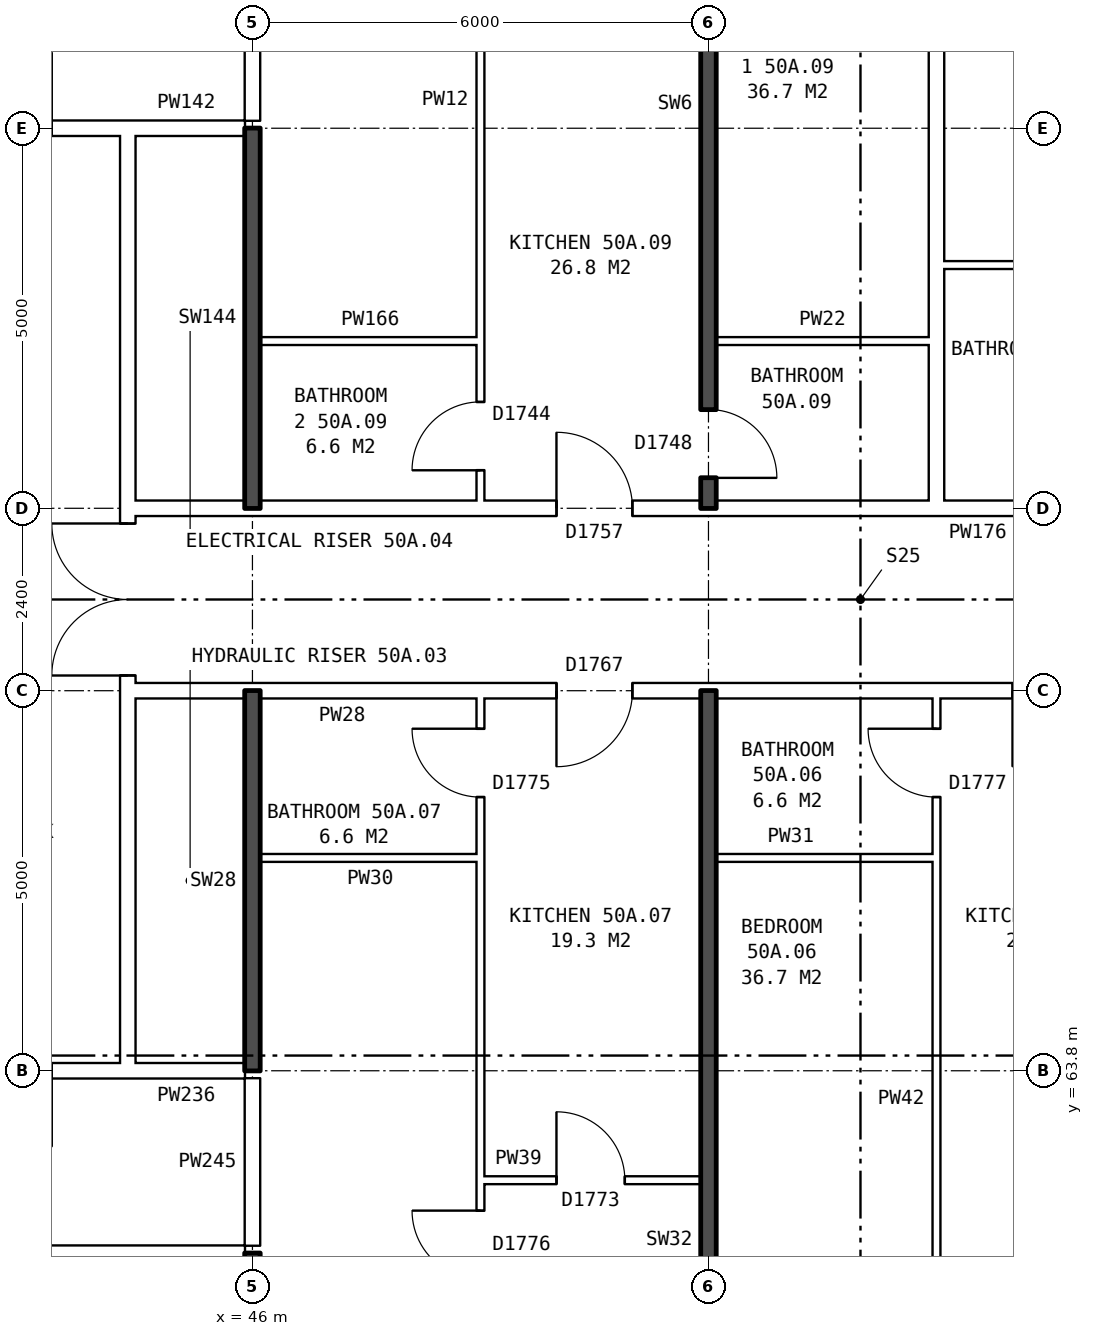
"""IFC4 building model, lengths in metres.
Left out: names, types, materials, properties, quantities, classifications, styles, units other than length and angle.
Written with IfcOpenShell. Run it as: python <this file> out.ifc"""

import sys

from ifc_helpers import new_model, si_unit, direction, frame, frame_2d, origin, place, context, subcontext, project, spatial, rectangle, extrude, element, fill, save


model = new_model("IFC4")
c1 = context("Model", 3, precision=1e-05, world=origin(), true_north=direction((0.0, 1.0)))
c2 = subcontext(c1, "Body", "Model", "MODEL_VIEW")
j1 = project(units=[si_unit("LENGTHUNIT", "METRE"), si_unit("PLANEANGLEUNIT", "RADIAN")], contexts=[c1])
p1 = place(None, origin())
s1 = spatial("IfcSite", under=j1, at=p1, CompositionType="ELEMENT")
p2 = place(p1, origin())
s2 = spatial("IfcBuilding", under=s1, at=p2, CompositionType="ELEMENT")
p3 = place(p2, frame((0.0, 0.0, 178.9)))
s3 = spatial("IfcBuildingStorey", under=s2, at=p3, CompositionType="ELEMENT", Elevation=178.9)
p4 = place(p3, frame((44.36, 63.9, 0.0), z_axis=(0.0, 0.0, 1.0), x_axis=(0.0, 1.0, 0.0)))
e1 = element("IfcWall", 1, at=p4, inside=s3, PredefinedType="PARTITIONING", context=c2, shape_type="SweptSolid", body=[
    extrude(rectangle(XDim=12.2, YDim=0.2, at=frame_2d((6.1, 0.0))), origin(), (0.0, 0.0, 1.0), 2.85),
])
p5 = place(p4, frame((5.1, 0.0, 0.0)))
e2 = element("IfcOpeningElement", 2, at=p5, cuts=e1, PredefinedType="OPENING", context=c2, shape_type="SweptSolid", body=[
    extrude(rectangle(XDim=2.0, YDim=2.1, at=frame_2d((1.0, 1.05))), frame((0.0, 0.11, 0.0), z_axis=(0.0, -1.0, 0.0), x_axis=(1.0, 0.0, 0.0)), (0.0, 0.0, 1.0), 0.22),
])
p6 = place(p3, frame((30.61, 61.4, 0.0), z_axis=(0.0, 0.0, 1.0), x_axis=(1.0, 0.0, 0.0)))
e3 = element("IfcWall", 3, at=p6, inside=s3, PredefinedType="PARTITIONING", context=c2, shape_type="SweptSolid", body=[
    extrude(rectangle(XDim=15.29, YDim=0.2, at=frame_2d((7.645, 0.0))), origin(), (0.0, 0.0, 1.0), 2.85),
])
p7 = place(p6, frame((10.69, 0.0, 0.0)))
e4 = element("IfcOpeningElement", 4, at=p7, cuts=e3, PredefinedType="OPENING", context=c2, shape_type="SweptSolid", body=[
    extrude(rectangle(XDim=1.0, YDim=2.1, at=frame_2d((0.5, 1.05))), frame((0.0, 0.11, 0.0), z_axis=(0.0, -1.0, 0.0), x_axis=(1.0, 0.0, 0.0)), (0.0, 0.0, 1.0), 0.22),
])
p8 = place(p6, frame((5.89, 0.0, 0.0)))
e5 = element("IfcOpeningElement", 5, at=p8, cuts=e3, PredefinedType="OPENING", context=c2, shape_type="SweptSolid", body=[
    extrude(rectangle(XDim=1.0, YDim=2.1, at=frame_2d((0.5, 1.05))), frame((0.0, 0.11, 0.0), z_axis=(0.0, -1.0, 0.0), x_axis=(1.0, 0.0, 0.0)), (0.0, 0.0, 1.0), 0.22),
])
p9 = place(p3, frame((49.0, 62.36, 0.0), z_axis=(0.0, 0.0, 1.0), x_axis=(1.0, 0.0, 0.0)))
e6 = element("IfcWall", 6, at=p9, inside=s3, PredefinedType="PARTITIONING", context=c2, shape_type="SweptSolid", body=[
    extrude(rectangle(XDim=2.9, YDim=0.1, at=frame_2d((1.45, 0.0))), origin(), (0.0, 0.0, 1.0), 2.85),
])
p10 = place(p9, frame((1.0, 0.0, 0.0)))
e7 = element("IfcOpeningElement", 7, at=p10, cuts=e6, PredefinedType="OPENING", context=c2, shape_type="SweptSolid", body=[
    extrude(rectangle(XDim=0.9, YDim=2.1, at=frame_2d((0.45, 1.05))), frame((0.0, 0.06, 0.0), z_axis=(0.0, -1.0, 0.0), x_axis=(1.0, 0.0, 0.0)), (0.0, 0.0, 1.0), 0.12),
])
p11 = place(p3, frame((41.36, 63.8, 0.0), z_axis=(0.0, 0.0, 1.0), x_axis=(1.0, 0.0, 0.0)))
e8 = element("IfcWall", 8, at=p11, inside=s3, PredefinedType="PARTITIONING", context=c2, shape_type="SweptSolid", body=[
    extrude(rectangle(XDim=3.0, YDim=0.2, at=frame_2d((1.5, 0.0))), origin(), (0.0, 0.0, 1.0), 2.85),
])
p12 = place(p11, frame((1.0, 0.0, 0.0)))
e9 = element("IfcOpeningElement", 9, at=p12, cuts=e8, PredefinedType="OPENING", context=c2, shape_type="SweptSolid", body=[
    extrude(rectangle(XDim=1.0, YDim=2.1, at=frame_2d((0.5, 1.05))), frame((0.0, 0.11, 0.0), z_axis=(0.0, -1.0, 0.0), x_axis=(1.0, 0.0, 0.0)), (0.0, 0.0, 1.0), 0.22),
])
p13 = place(p3, frame((44.36, 63.8, 0.0), z_axis=(0.0, 0.0, 1.0), x_axis=(1.0, 0.0, 0.0)))
e10 = element("IfcWall", 10, at=p13, inside=s3, PredefinedType="PARTITIONING", context=c2, shape_type="SweptSolid", body=[
    extrude(rectangle(XDim=1.54, YDim=0.2, at=frame_2d((0.77, 0.0))), origin(), (0.0, 0.0, 1.0), 2.85),
])
for number, where, z_axis, x_axis in (
    (11, (46.1, 66.6, 0.0), (0.0, 0.0, 1.0), (1.0, 0.0, 0.0)),
    (12, (52.1, 66.6, 0.0), (0.0, 0.0, 1.0), (1.0, 0.0, 0.0)),
):
    element("IfcWall", number, at=place(p3, frame(where, z_axis=z_axis, x_axis=x_axis)), inside=s3, PredefinedType="PARTITIONING", context=c2, shape_type="SweptSolid", body=[
        extrude(rectangle(XDim=2.9, YDim=0.1, at=frame_2d((1.45, 0.0))), origin(), (0.0, 0.0, 1.0), 2.85),
    ])
p14 = place(p3, frame((44.36, 68.8, 0.0), z_axis=(0.0, 0.0, 1.0), x_axis=(1.0, 0.0, 0.0)))
e13 = element("IfcWall", 13, at=p14, inside=s3, PredefinedType="PARTITIONING", context=c2, shape_type="SweptSolid", body=[
    extrude(rectangle(XDim=19.28, YDim=0.2, at=frame_2d((9.64, 0.0))), origin(), (0.0, 0.0, 1.0), 2.85),
])
p15 = place(p14, frame((14.64, 0.0, 0.0)))
e14 = element("IfcOpeningElement", 14, at=p15, cuts=e13, PredefinedType="OPENING", context=c2, shape_type="SweptSolid", body=[
    extrude(rectangle(XDim=1.0, YDim=2.1, at=frame_2d((0.5, 1.05))), frame((0.0, 0.11, 0.0), z_axis=(0.0, -1.0, 0.0), x_axis=(1.0, 0.0, 0.0)), (0.0, 0.0, 1.0), 0.22),
])
p16 = place(p14, frame((11.64, 0.0, 0.0)))
e15 = element("IfcOpeningElement", 15, at=p16, cuts=e13, PredefinedType="OPENING", context=c2, shape_type="SweptSolid", body=[
    extrude(rectangle(XDim=1.0, YDim=2.1, at=frame_2d((0.5, 1.05))), frame((0.0, 0.11, 0.0), z_axis=(0.0, -1.0, 0.0), x_axis=(1.0, 0.0, 0.0)), (0.0, 0.0, 1.0), 0.22),
])
p17 = place(p14, frame((5.64, 0.0, 0.0)))
e16 = element("IfcOpeningElement", 16, at=p17, cuts=e13, PredefinedType="OPENING", context=c2, shape_type="SweptSolid", body=[
    extrude(rectangle(XDim=1.0, YDim=2.1, at=frame_2d((0.5, 1.05))), frame((0.0, 0.11, 0.0), z_axis=(0.0, -1.0, 0.0), x_axis=(1.0, 0.0, 0.0)), (0.0, 0.0, 1.0), 0.22),
])
p18 = place(p3, frame((44.36, 71.2, 0.0), z_axis=(0.0, 0.0, 1.0), x_axis=(1.0, 0.0, 0.0)))
e17 = element("IfcWall", 17, at=p18, inside=s3, PredefinedType="PARTITIONING", context=c2, shape_type="SweptSolid", body=[
    extrude(rectangle(XDim=19.28, YDim=0.2, at=frame_2d((9.64, 0.0))), origin(), (0.0, 0.0, 1.0), 2.85),
])
p19 = place(p18, frame((14.64, 0.0, 0.0)))
e18 = element("IfcOpeningElement", 18, at=p19, cuts=e17, PredefinedType="OPENING", context=c2, shape_type="SweptSolid", body=[
    extrude(rectangle(XDim=1.0, YDim=2.1, at=frame_2d((0.5, 1.05))), frame((0.0, 0.11, 0.0), z_axis=(0.0, -1.0, 0.0), x_axis=(1.0, 0.0, 0.0)), (0.0, 0.0, 1.0), 0.22),
])
p20 = place(p18, frame((5.64, 0.0, 0.0)))
e19 = element("IfcOpeningElement", 19, at=p20, cuts=e17, PredefinedType="OPENING", context=c2, shape_type="SweptSolid", body=[
    extrude(rectangle(XDim=1.0, YDim=2.1, at=frame_2d((0.5, 1.05))), frame((0.0, 0.11, 0.0), z_axis=(0.0, -1.0, 0.0), x_axis=(1.0, 0.0, 0.0)), (0.0, 0.0, 1.0), 0.22),
])
p21 = place(p3, frame((46.1, 73.4, 0.0), z_axis=(0.0, 0.0, 1.0), x_axis=(1.0, 0.0, 0.0)))
e20 = element("IfcWall", 20, at=p21, inside=s3, PredefinedType="PARTITIONING", context=c2, shape_type="SweptSolid", body=[
    extrude(rectangle(XDim=2.9, YDim=0.1, at=frame_2d((1.45, 0.0))), origin(), (0.0, 0.0, 1.0), 2.85),
])
for number, where, z_axis, x_axis in (
    (21, (52.1, 73.4, 0.0), (0.0, 0.0, 1.0), (1.0, 0.0, 0.0)),
    (22, (55.1, 74.4, 0.0), (0.0, 0.0, 1.0), (1.0, 0.0, 0.0)),
):
    element("IfcWall", number, at=place(p3, frame(where, z_axis=z_axis, x_axis=x_axis)), inside=s3, PredefinedType="PARTITIONING", context=c2, shape_type="SweptSolid", body=[
        extrude(rectangle(XDim=2.8, YDim=0.1, at=frame_2d((1.4, 0.0))), origin(), (0.0, 0.0, 1.0), 2.85),
    ])
p22 = place(p3, frame((41.36, 76.2, 0.0), z_axis=(0.0, 0.0, 1.0), x_axis=(1.0, 0.0, 0.0)))
e23 = element("IfcWall", 23, at=p22, inside=s3, PredefinedType="PARTITIONING", context=c2, shape_type="SweptSolid", body=[
    extrude(rectangle(XDim=3.0, YDim=0.2, at=frame_2d((1.5, 0.0))), origin(), (0.0, 0.0, 1.0), 2.85),
])
p23 = place(p22, frame((1.0, 0.0, 0.0)))
e24 = element("IfcOpeningElement", 24, at=p23, cuts=e23, PredefinedType="OPENING", context=c2, shape_type="SweptSolid", body=[
    extrude(rectangle(XDim=1.0, YDim=2.1, at=frame_2d((0.5, 1.05))), frame((0.0, 0.11, 0.0), z_axis=(0.0, -1.0, 0.0), x_axis=(1.0, 0.0, 0.0)), (0.0, 0.0, 1.0), 0.22),
])
p24 = place(p3, frame((44.36, 76.2, 0.0), z_axis=(0.0, 0.0, 1.0), x_axis=(1.0, 0.0, 0.0)))
e25 = element("IfcWall", 25, at=p24, inside=s3, PredefinedType="PARTITIONING", context=c2, shape_type="SweptSolid", body=[
    extrude(rectangle(XDim=1.54, YDim=0.2, at=frame_2d((0.77, 0.0))), origin(), (0.0, 0.0, 1.0), 2.85),
])
p25 = place(p3, frame((46.0, 54.36, 0.0), z_axis=(0.0, 0.0, 1.0), x_axis=(0.0, 1.0, 0.0)))
e26 = element("IfcWall", 26, at=p25, inside=s3, PredefinedType="SOLIDWALL", context=c2, shape_type="SweptSolid", body=[
    extrude(rectangle(XDim=7.04, YDim=0.2, at=frame_2d((3.52, 0.0))), origin(), (0.0, 0.0, 1.0), 2.85),
])
p26 = place(p3, frame((46.0, 61.5, 0.0), z_axis=(0.0, 0.0, 1.0), x_axis=(0.0, 1.0, 0.0)))
e27 = element("IfcWall", 27, at=p26, inside=s3, PredefinedType="PARTITIONING", context=c2, shape_type="SweptSolid", body=[
    extrude(rectangle(XDim=2.2, YDim=0.2, at=frame_2d((1.1, 0.0))), origin(), (0.0, 0.0, 1.0), 2.85),
])
for number, where, z_axis, x_axis in (
    (28, (46.0, 63.8, 0.0), (0.0, 0.0, 1.0), (0.0, 1.0, 0.0)),
    (29, (46.0, 71.2, 0.0), (0.0, 0.0, 1.0), (0.0, 1.0, 0.0)),
):
    element("IfcWall", number, at=place(p3, frame(where, z_axis=z_axis, x_axis=x_axis)), inside=s3, PredefinedType="SOLIDWALL", context=c2, shape_type="SweptSolid", body=[
        extrude(rectangle(XDim=5.0, YDim=0.2, at=frame_2d((2.5, 0.0))), origin(), (0.0, 0.0, 1.0), 2.85),
    ])
p27 = place(p3, frame((46.0, 76.3, 0.0), z_axis=(0.0, 0.0, 1.0), x_axis=(0.0, 1.0, 0.0)))
e30 = element("IfcWall", 30, at=p27, inside=s3, PredefinedType="PARTITIONING", context=c2, shape_type="SweptSolid", body=[
    extrude(rectangle(XDim=2.2, YDim=0.2, at=frame_2d((1.1, 0.0))), origin(), (0.0, 0.0, 1.0), 2.85),
])
p28 = place(p3, frame((49.0, 54.36, 0.0), z_axis=(0.0, 0.0, 1.0), x_axis=(0.0, 1.0, 0.0)))
e31 = element("IfcWall", 31, at=p28, inside=s3, PredefinedType="PARTITIONING", context=c2, shape_type="SweptSolid", body=[
    extrude(rectangle(XDim=14.34, YDim=0.1, at=frame_2d((7.17, 0.0))), origin(), (0.0, 0.0, 1.0), 2.85),
])
p29 = place(p28, frame((6.7, 0.0, 0.0)))
e32 = element("IfcOpeningElement", 32, at=p29, cuts=e31, PredefinedType="OPENING", context=c2, shape_type="SweptSolid", body=[
    extrude(rectangle(XDim=0.9, YDim=2.1, at=frame_2d((0.45, 1.05))), frame((0.0, 0.06, 0.0), z_axis=(0.0, -1.0, 0.0), x_axis=(1.0, 0.0, 0.0)), (0.0, 0.0, 1.0), 0.12),
])
p30 = place(p28, frame((13.04, 0.0, 0.0)))
e33 = element("IfcOpeningElement", 33, at=p30, cuts=e31, PredefinedType="OPENING", context=c2, shape_type="SweptSolid", body=[
    extrude(rectangle(XDim=0.9, YDim=2.1, at=frame_2d((0.45, 1.05))), frame((0.0, 0.06, 0.0), z_axis=(0.0, -1.0, 0.0), x_axis=(1.0, 0.0, 0.0)), (0.0, 0.0, 1.0), 0.12),
])
p31 = place(p3, frame((49.0, 71.3, 0.0), z_axis=(0.0, 0.0, 1.0), x_axis=(0.0, 1.0, 0.0)))
e34 = element("IfcWall", 34, at=p31, inside=s3, PredefinedType="PARTITIONING", context=c2, shape_type="SweptSolid", body=[
    extrude(rectangle(XDim=14.34, YDim=0.1, at=frame_2d((7.17, 0.0))), origin(), (0.0, 0.0, 1.0), 2.85),
])
p32 = place(p31, frame((9.24, 0.0, 0.0)))
e35 = element("IfcOpeningElement", 35, at=p32, cuts=e34, PredefinedType="OPENING", context=c2, shape_type="SweptSolid", body=[
    extrude(rectangle(XDim=0.9, YDim=2.1, at=frame_2d((0.45, 1.05))), frame((0.0, 0.06, 0.0), z_axis=(0.0, -1.0, 0.0), x_axis=(1.0, 0.0, 0.0)), (0.0, 0.0, 1.0), 0.12),
])
p33 = place(p31, frame((0.4, 0.0, 0.0)))
e36 = element("IfcOpeningElement", 36, at=p33, cuts=e34, PredefinedType="OPENING", context=c2, shape_type="SweptSolid", body=[
    extrude(rectangle(XDim=0.9, YDim=2.1, at=frame_2d((0.45, 1.05))), frame((0.0, 0.06, 0.0), z_axis=(0.0, -1.0, 0.0), x_axis=(1.0, 0.0, 0.0)), (0.0, 0.0, 1.0), 0.12),
])
p34 = place(p3, frame((52.0, 54.36, 0.0), z_axis=(0.0, 0.0, 1.0), x_axis=(0.0, 1.0, 0.0)))
e37 = element("IfcWall", 37, at=p34, inside=s3, PredefinedType="SOLIDWALL", context=c2, shape_type="SweptSolid", body=[
    extrude(rectangle(XDim=14.44, YDim=0.2, at=frame_2d((7.22, 0.0))), origin(), (0.0, 0.0, 1.0), 2.85),
])
p35 = place(p3, frame((52.0, 71.2, 0.0), z_axis=(0.0, 0.0, 1.0), x_axis=(0.0, 1.0, 0.0)))
e38 = element("IfcWall", 38, at=p35, inside=s3, PredefinedType="SOLIDWALL", context=c2, shape_type="SweptSolid", body=[
    extrude(rectangle(XDim=14.44, YDim=0.2, at=frame_2d((7.22, 0.0))), origin(), (0.0, 0.0, 1.0), 2.85),
])
p36 = place(p35, frame((9.34, 0.0, 0.0)))
e39 = element("IfcOpeningElement", 39, at=p36, cuts=e38, PredefinedType="OPENING", context=c2, shape_type="SweptSolid", body=[
    extrude(rectangle(XDim=0.9, YDim=2.1, at=frame_2d((0.45, 1.05))), frame((0.0, 0.11, 0.0), z_axis=(0.0, -1.0, 0.0), x_axis=(1.0, 0.0, 0.0)), (0.0, 0.0, 1.0), 0.22),
])
p37 = place(p35, frame((0.4, 0.0, 0.0)))
e40 = element("IfcOpeningElement", 40, at=p37, cuts=e38, PredefinedType="OPENING", context=c2, shape_type="SweptSolid", body=[
    extrude(rectangle(XDim=0.9, YDim=2.1, at=frame_2d((0.45, 1.05))), frame((0.0, 0.11, 0.0), z_axis=(0.0, -1.0, 0.0), x_axis=(1.0, 0.0, 0.0)), (0.0, 0.0, 1.0), 0.22),
])
p38 = place(p3, frame((55.0, 54.36, 0.0), z_axis=(0.0, 0.0, 1.0), x_axis=(0.0, 1.0, 0.0)))
e41 = element("IfcWall", 41, at=p38, inside=s3, PredefinedType="PARTITIONING", context=c2, shape_type="SweptSolid", body=[
    extrude(rectangle(XDim=14.34, YDim=0.1, at=frame_2d((7.17, 0.0))), origin(), (0.0, 0.0, 1.0), 2.85),
])
p39 = place(p38, frame((4.2, 0.0, 0.0)))
e42 = element("IfcOpeningElement", 42, at=p39, cuts=e41, PredefinedType="OPENING", context=c2, shape_type="SweptSolid", body=[
    extrude(rectangle(XDim=0.9, YDim=2.1, at=frame_2d((0.45, 1.05))), frame((0.0, 0.06, 0.0), z_axis=(0.0, -1.0, 0.0), x_axis=(1.0, 0.0, 0.0)), (0.0, 0.0, 1.0), 0.12),
])
p40 = place(p38, frame((13.04, 0.0, 0.0)))
e43 = element("IfcOpeningElement", 43, at=p40, cuts=e41, PredefinedType="OPENING", context=c2, shape_type="SweptSolid", body=[
    extrude(rectangle(XDim=0.9, YDim=2.1, at=frame_2d((0.45, 1.05))), frame((0.0, 0.06, 0.0), z_axis=(0.0, -1.0, 0.0), x_axis=(1.0, 0.0, 0.0)), (0.0, 0.0, 1.0), 0.12),
])
p41 = place(p3, frame((55.0, 71.3, 0.0), z_axis=(0.0, 0.0, 1.0), x_axis=(0.0, 1.0, 0.0)))
e44 = element("IfcWall", 44, at=p41, inside=s3, PredefinedType="PARTITIONING", context=c2, shape_type="SweptSolid", body=[
    extrude(rectangle(XDim=14.34, YDim=0.2, at=frame_2d((7.17, 0.0))), origin(), (0.0, 0.0, 1.0), 2.85),
])
p42 = place(p5, origin())
e45 = element("IfcDoor", 45, at=p42, inside=s3, OperationType="DOUBLE_DOOR_SINGLE_SWING", PredefinedType="DOOR", context=c2, shape_type="SweptSolid", body=[
    extrude(rectangle(XDim=2.0, YDim=2.1, at=frame_2d((1.0, 1.05))), frame((0.0, 0.025, 0.0), z_axis=(0.0, -1.0, 0.0), x_axis=(1.0, 0.0, 0.0)), (0.0, 0.0, 1.0), 0.05),
])
fill(e2, e45)
p43 = place(p40, origin())
e46 = element("IfcDoor", 46, at=p43, inside=s3, OperationType="SINGLE_SWING_RIGHT", PredefinedType="DOOR", context=c2, shape_type="SweptSolid", body=[
    extrude(rectangle(XDim=0.9, YDim=2.1, at=frame_2d((0.45, 1.05))), frame((0.0, 0.025, 0.0), z_axis=(0.0, -1.0, 0.0), x_axis=(1.0, 0.0, 0.0)), (0.0, 0.0, 1.0), 0.05),
])
fill(e43, e46)
p44 = place(p29, origin())
e47 = element("IfcDoor", 47, at=p44, inside=s3, OperationType="SINGLE_SWING_RIGHT", PredefinedType="DOOR", context=c2, shape_type="SweptSolid", body=[
    extrude(rectangle(XDim=0.9, YDim=2.1, at=frame_2d((0.45, 1.05))), frame((0.0, 0.025, 0.0), z_axis=(0.0, -1.0, 0.0), x_axis=(1.0, 0.0, 0.0)), (0.0, 0.0, 1.0), 0.05),
])
fill(e32, e47)
p45 = place(p17, frame((1.0, 0.0, 0.0), z_axis=(0.0, 0.0, 1.0), x_axis=(-1.0, 0.0, 0.0)))
e48 = element("IfcDoor", 48, at=p45, inside=s3, OperationType="SINGLE_SWING_RIGHT", PredefinedType="DOOR", context=c2, shape_type="SweptSolid", body=[
    extrude(rectangle(XDim=1.0, YDim=2.1, at=frame_2d((0.5, 1.05))), frame((0.0, 0.025, 0.0), z_axis=(0.0, -1.0, 0.0), x_axis=(1.0, 0.0, 0.0)), (0.0, 0.0, 1.0), 0.05),
])
fill(e16, e48)
p46 = place(p10, origin())
e49 = element("IfcDoor", 49, at=p46, inside=s3, OperationType="SINGLE_SWING_LEFT", PredefinedType="DOOR", context=c2, shape_type="SweptSolid", body=[
    extrude(rectangle(XDim=0.9, YDim=2.1, at=frame_2d((0.45, 1.05))), frame((0.0, 0.025, 0.0), z_axis=(0.0, -1.0, 0.0), x_axis=(1.0, 0.0, 0.0)), (0.0, 0.0, 1.0), 0.05),
])
fill(e7, e49)
p47 = place(p30, origin())
e50 = element("IfcDoor", 50, at=p47, inside=s3, OperationType="SINGLE_SWING_RIGHT", PredefinedType="DOOR", context=c2, shape_type="SweptSolid", body=[
    extrude(rectangle(XDim=0.9, YDim=2.1, at=frame_2d((0.45, 1.05))), frame((0.0, 0.025, 0.0), z_axis=(0.0, -1.0, 0.0), x_axis=(1.0, 0.0, 0.0)), (0.0, 0.0, 1.0), 0.05),
])
fill(e33, e50)
p48 = place(p20, origin())
e51 = element("IfcDoor", 51, at=p48, inside=s3, OperationType="SINGLE_SWING_LEFT", PredefinedType="DOOR", context=c2, shape_type="SweptSolid", body=[
    extrude(rectangle(XDim=1.0, YDim=2.1, at=frame_2d((0.5, 1.05))), frame((0.0, 0.025, 0.0), z_axis=(0.0, -1.0, 0.0), x_axis=(1.0, 0.0, 0.0)), (0.0, 0.0, 1.0), 0.05),
])
fill(e19, e51)
p49 = place(p37, frame((0.9, 0.0, 0.0), z_axis=(0.0, 0.0, 1.0), x_axis=(-1.0, 0.0, 0.0)))
e52 = element("IfcDoor", 52, at=p49, inside=s3, OperationType="SINGLE_SWING_RIGHT", PredefinedType="DOOR", context=c2, shape_type="SweptSolid", body=[
    extrude(rectangle(XDim=0.9, YDim=2.1, at=frame_2d((0.45, 1.05))), frame((0.0, 0.025, 0.0), z_axis=(0.0, -1.0, 0.0), x_axis=(1.0, 0.0, 0.0)), (0.0, 0.0, 1.0), 0.05),
])
fill(e40, e52)
p50 = place(p33, origin())
e53 = element("IfcDoor", 53, at=p50, inside=s3, OperationType="SINGLE_SWING_LEFT", PredefinedType="DOOR", context=c2, shape_type="SweptSolid", body=[
    extrude(rectangle(XDim=0.9, YDim=2.1, at=frame_2d((0.45, 1.05))), frame((0.0, 0.025, 0.0), z_axis=(0.0, -1.0, 0.0), x_axis=(1.0, 0.0, 0.0)), (0.0, 0.0, 1.0), 0.05),
])
fill(e36, e53)
save(model, sys.argv[1])
